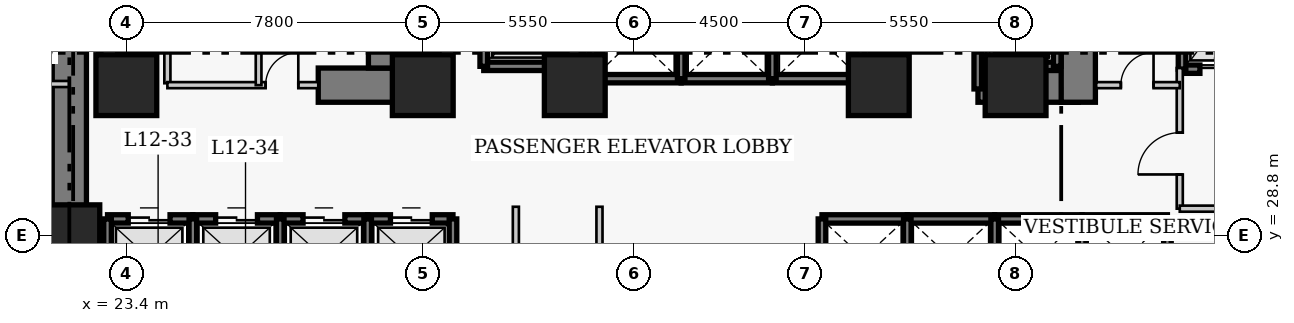
"""IFC4 building model, lengths in metres.
Left out: names, types, materials, properties, quantities, classifications, styles, units other than length and angle.
Written with IfcOpenShell. Run it as: python <this file> out.ifc"""

import sys

from ifc_helpers import new_model, si_unit, direction, frame, frame_2d, origin, origin_2d, place, context, subcontext, project, spatial, rectangle, extrude, element, fill, save


model = new_model("IFC4")
c1 = context("Model", 3, precision=1e-05, world=origin(), true_north=direction((0.0, 1.0)))
c2 = subcontext(c1, "Body", "Model", "MODEL_VIEW")
j1 = project(units=[si_unit("LENGTHUNIT", "METRE"), si_unit("PLANEANGLEUNIT", "RADIAN")], contexts=[c1])
p1 = place(None, origin())
s1 = spatial("IfcSite", under=j1, at=p1, CompositionType="ELEMENT")
p2 = place(p1, origin())
s2 = spatial("IfcBuilding", under=s1, at=p2, CompositionType="ELEMENT")
p3 = place(p2, frame((0.0, 0.0, 52.6)))
s3 = spatial("IfcBuildingStorey", under=s2, at=p3, CompositionType="ELEMENT", Elevation=52.6)
p4 = place(p3, frame((21.9, 27.05, 0.0), z_axis=(0.0, 0.0, 1.0), x_axis=(0.0, 1.0, 0.0)))
e1 = element("IfcWall", 1, at=p4, inside=s3, PredefinedType="SHEAR", context=c2, shape_type="SweptSolid", body=[
    extrude(rectangle(XDim=13.72, YDim=0.9, at=frame_2d((6.86, 0.0))), origin(), (0.0, 0.0, 1.0), 3.8),
])
p5 = place(p3, frame((28.45, 32.75, 0.0), z_axis=(0.0, 0.0, 1.0), x_axis=(1.0, 0.0, 0.0)))
e2 = element("IfcWall", 2, at=p5, inside=s3, PredefinedType="SHEAR", context=c2, shape_type="SweptSolid", body=[
    extrude(rectangle(XDim=2.4, YDim=0.9, at=frame_2d((1.2, 0.0))), origin(), (0.0, 0.0, 1.0), 3.8),
])
p6 = place(p3, frame((45.81, 32.75, 0.0), z_axis=(0.0, 0.0, 1.0), x_axis=(1.0, 0.0, 0.0)))
e3 = element("IfcWall", 3, at=p6, inside=s3, PredefinedType="SHEAR", context=c2, shape_type="SweptSolid", body=[
    extrude(rectangle(XDim=2.64, YDim=0.9, at=frame_2d((1.32, 0.0))), origin(), (0.0, 0.0, 1.0), 3.8),
])
p7 = place(p3, frame((30.22, 33.2, 0.0), z_axis=(0.0, 0.0, 1.0), x_axis=(0.0, 1.0, 0.0)))
e4 = element("IfcWall", 4, at=p7, inside=s3, PredefinedType="SHEAR", context=c2, shape_type="SweptSolid", body=[
    extrude(rectangle(XDim=7.12, YDim=0.9, at=frame_2d((3.56, 0.0))), origin(), (0.0, 0.0, 1.0), 3.8),
])
p8 = place(p3, frame((48.45, 32.3, 0.0), z_axis=(0.0, 0.0, 1.0), x_axis=(0.0, 1.0, 0.0)))
e5 = element("IfcWall", 5, at=p8, inside=s3, PredefinedType="SHEAR", context=c2, shape_type="SweptSolid", body=[
    extrude(rectangle(XDim=8.02, YDim=0.9, at=frame_2d((4.01, 0.0))), origin(), (0.0, 0.0, 1.0), 3.8),
])
p9 = place(p8, frame((5.9, 0.0, 0.0)))
e6 = element("IfcOpeningElement", 6, at=p9, cuts=e5, PredefinedType="OPENING", context=c2, shape_type="SweptSolid", body=[
    extrude(rectangle(XDim=1.1, YDim=2.15, at=frame_2d((0.55, 1.075))), frame((0.0, 0.46, 0.0), z_axis=(0.0, -1.0, 0.0), x_axis=(1.0, 0.0, 0.0)), (0.0, 0.0, 1.0), 0.92),
])
for number, where, z_axis, x_axis in (
    (7, (21.9, 28.8, 0.0), (0.0, 0.0, 1.0), (1.0, 0.0, 0.0)),
    (8, (23.4, 32.75, 0.0), (0.0, 0.0, 1.0), (1.0, 0.0, 0.0)),
    (9, (31.2, 32.75, 0.0), (0.0, 0.0, 1.0), (1.0, 0.0, 0.0)),
    (10, (35.2, 32.75, 0.0), (0.0, 0.0, 1.0), (1.0, 0.0, 0.0)),
    (11, (43.2, 32.75, 0.0), (0.0, 0.0, 1.0), (1.0, 0.0, 0.0)),
    (12, (46.8, 32.75, 0.0), (0.0, 0.0, 1.0), (1.0, 0.0, 0.0)),
):
    element("IfcColumn", number, at=place(p3, frame(where, z_axis=z_axis, x_axis=x_axis)), inside=s3, PredefinedType="COLUMN", context=c2, shape_type="SweptSolid", body=[
        extrude(rectangle(XDim=1.6, YDim=1.6, at=origin_2d()), origin(), (0.0, 0.0, 1.0), 3.8),
    ])
p10 = place(p3, frame((22.905, 29.23, 0.0), z_axis=(0.0, 0.0, 1.0), x_axis=(1.0, 0.0, 0.0)))
e13 = element("IfcWall", 13, at=p10, inside=s3, PredefinedType="SHEAR", context=c2, shape_type="SweptSolid", body=[
    extrude(rectangle(XDim=2.245, YDim=0.22, at=frame_2d((1.123, 0.0))), origin(), (0.0, 0.0, 1.0), 3.8),
])
p11 = place(p10, frame((0.545, 0.0, 0.0)))
e14 = element("IfcOpeningElement", 14, at=p11, cuts=e13, PredefinedType="OPENING", context=c2, shape_type="SweptSolid", body=[
    extrude(rectangle(XDim=1.1, YDim=2.15, at=frame_2d((0.55, 1.075))), frame((0.0, 0.12, 0.0), z_axis=(0.0, -1.0, 0.0), x_axis=(1.0, 0.0, 0.0)), (0.0, 0.0, 1.0), 0.24),
])
p12 = place(p3, frame((22.905, 27.17, 0.0), z_axis=(0.0, 0.0, 1.0), x_axis=(0.0, 1.0, 0.0)))
e15 = element("IfcWall", 15, at=p12, inside=s3, PredefinedType="SHEAR", context=c2, shape_type="SweptSolid", body=[
    extrude(rectangle(XDim=2.06, YDim=0.2, at=frame_2d((1.03, 0.0))), origin(), (0.0, 0.0, 1.0), 3.8),
])
p13 = place(p3, frame((25.15, 29.23, 0.0), z_axis=(0.0, 0.0, 1.0), x_axis=(1.0, 0.0, 0.0)))
e16 = element("IfcWall", 16, at=p13, inside=s3, PredefinedType="SHEAR", context=c2, shape_type="SweptSolid", body=[
    extrude(rectangle(XDim=2.3, YDim=0.22, at=frame_2d((1.15, 0.0))), origin(), (0.0, 0.0, 1.0), 3.8),
])
p14 = place(p13, frame((0.6, 0.0, 0.0)))
e17 = element("IfcOpeningElement", 17, at=p14, cuts=e16, PredefinedType="OPENING", context=c2, shape_type="SweptSolid", body=[
    extrude(rectangle(XDim=1.1, YDim=2.15, at=frame_2d((0.55, 1.075))), frame((0.0, 0.12, 0.0), z_axis=(0.0, -1.0, 0.0), x_axis=(1.0, 0.0, 0.0)), (0.0, 0.0, 1.0), 0.24),
])
p15 = place(p3, frame((25.15, 27.17, 0.0), z_axis=(0.0, 0.0, 1.0), x_axis=(0.0, 1.0, 0.0)))
e18 = element("IfcWall", 18, at=p15, inside=s3, PredefinedType="SHEAR", context=c2, shape_type="SweptSolid", body=[
    extrude(rectangle(XDim=2.06, YDim=0.2, at=frame_2d((1.03, 0.0))), origin(), (0.0, 0.0, 1.0), 3.8),
])
p16 = place(p3, frame((27.45, 29.23, 0.0), z_axis=(0.0, 0.0, 1.0), x_axis=(1.0, 0.0, 0.0)))
e19 = element("IfcWall", 19, at=p16, inside=s3, PredefinedType="SHEAR", context=c2, shape_type="SweptSolid", body=[
    extrude(rectangle(XDim=2.3, YDim=0.22, at=frame_2d((1.15, 0.0))), origin(), (0.0, 0.0, 1.0), 3.8),
])
p17 = place(p16, frame((0.6, 0.0, 0.0)))
e20 = element("IfcOpeningElement", 20, at=p17, cuts=e19, PredefinedType="OPENING", context=c2, shape_type="SweptSolid", body=[
    extrude(rectangle(XDim=1.1, YDim=2.15, at=frame_2d((0.55, 1.075))), frame((0.0, 0.12, 0.0), z_axis=(0.0, -1.0, 0.0), x_axis=(1.0, 0.0, 0.0)), (0.0, 0.0, 1.0), 0.24),
])
p18 = place(p3, frame((27.45, 27.17, 0.0), z_axis=(0.0, 0.0, 1.0), x_axis=(0.0, 1.0, 0.0)))
e21 = element("IfcWall", 21, at=p18, inside=s3, PredefinedType="SHEAR", context=c2, shape_type="SweptSolid", body=[
    extrude(rectangle(XDim=2.06, YDim=0.2, at=frame_2d((1.03, 0.0))), origin(), (0.0, 0.0, 1.0), 3.8),
])
p19 = place(p3, frame((29.75, 29.23, 0.0), z_axis=(0.0, 0.0, 1.0), x_axis=(1.0, 0.0, 0.0)))
e22 = element("IfcWall", 22, at=p19, inside=s3, PredefinedType="SHEAR", context=c2, shape_type="SweptSolid", body=[
    extrude(rectangle(XDim=2.245, YDim=0.22, at=frame_2d((1.123, 0.0))), origin(), (0.0, 0.0, 1.0), 3.8),
])
p20 = place(p19, frame((0.6, 0.0, 0.0)))
e23 = element("IfcOpeningElement", 23, at=p20, cuts=e22, PredefinedType="OPENING", context=c2, shape_type="SweptSolid", body=[
    extrude(rectangle(XDim=1.1, YDim=2.15, at=frame_2d((0.55, 1.075))), frame((0.0, 0.12, 0.0), z_axis=(0.0, -1.0, 0.0), x_axis=(1.0, 0.0, 0.0)), (0.0, 0.0, 1.0), 0.24),
])
for number, where, z_axis, x_axis in (
    (24, (29.75, 27.17, 0.0), (0.0, 0.0, 1.0), (0.0, 1.0, 0.0)),
    (25, (31.995, 27.17, 0.0), (0.0, 0.0, 1.0), (0.0, 1.0, 0.0)),
):
    element("IfcWall", number, at=place(p3, frame(where, z_axis=z_axis, x_axis=x_axis)), inside=s3, PredefinedType="SHEAR", context=c2, shape_type="SweptSolid", body=[
        extrude(rectangle(XDim=2.06, YDim=0.2, at=frame_2d((1.03, 0.0))), origin(), (0.0, 0.0, 1.0), 3.8),
    ])
p21 = place(p3, frame((41.705, 29.23, 0.0), z_axis=(0.0, 0.0, 1.0), x_axis=(1.0, 0.0, 0.0)))
e26 = element("IfcWall", 26, at=p21, inside=s3, PredefinedType="SHEAR", context=c2, shape_type="SweptSolid", body=[
    extrude(rectangle(XDim=2.245, YDim=0.22, at=frame_2d((1.123, 0.0))), origin(), (0.0, 0.0, 1.0), 3.8),
])
p22 = place(p3, frame((41.705, 27.17, 0.0), z_axis=(0.0, 0.0, 1.0), x_axis=(0.0, 1.0, 0.0)))
e27 = element("IfcWall", 27, at=p22, inside=s3, PredefinedType="SHEAR", context=c2, shape_type="SweptSolid", body=[
    extrude(rectangle(XDim=2.06, YDim=0.2, at=frame_2d((1.03, 0.0))), origin(), (0.0, 0.0, 1.0), 3.8),
])
p23 = place(p3, frame((43.95, 29.23, 0.0), z_axis=(0.0, 0.0, 1.0), x_axis=(1.0, 0.0, 0.0)))
e28 = element("IfcWall", 28, at=p23, inside=s3, PredefinedType="SHEAR", context=c2, shape_type="SweptSolid", body=[
    extrude(rectangle(XDim=2.3, YDim=0.22, at=frame_2d((1.15, 0.0))), origin(), (0.0, 0.0, 1.0), 3.8),
])
p24 = place(p3, frame((43.95, 27.17, 0.0), z_axis=(0.0, 0.0, 1.0), x_axis=(0.0, 1.0, 0.0)))
e29 = element("IfcWall", 29, at=p24, inside=s3, PredefinedType="SHEAR", context=c2, shape_type="SweptSolid", body=[
    extrude(rectangle(XDim=2.06, YDim=0.2, at=frame_2d((1.03, 0.0))), origin(), (0.0, 0.0, 1.0), 3.8),
])
p25 = place(p3, frame((46.25, 29.23, 0.0), z_axis=(0.0, 0.0, 1.0), x_axis=(1.0, 0.0, 0.0)))
e30 = element("IfcWall", 30, at=p25, inside=s3, PredefinedType="SHEAR", context=c2, shape_type="SweptSolid", body=[
    extrude(rectangle(XDim=2.3, YDim=0.22, at=frame_2d((1.15, 0.0))), origin(), (0.0, 0.0, 1.0), 3.8),
])
p26 = place(p3, frame((46.25, 27.17, 0.0), z_axis=(0.0, 0.0, 1.0), x_axis=(0.0, 1.0, 0.0)))
e31 = element("IfcWall", 31, at=p26, inside=s3, PredefinedType="SHEAR", context=c2, shape_type="SweptSolid", body=[
    extrude(rectangle(XDim=2.06, YDim=0.2, at=frame_2d((1.03, 0.0))), origin(), (0.0, 0.0, 1.0), 3.8),
])
p27 = place(p3, frame((48.55, 29.23, 0.0), z_axis=(0.0, 0.0, 1.0), x_axis=(1.0, 0.0, 0.0)))
e32 = element("IfcWall", 32, at=p27, inside=s3, PredefinedType="SHEAR", context=c2, shape_type="SweptSolid", body=[
    extrude(rectangle(XDim=2.245, YDim=0.22, at=frame_2d((1.123, 0.0))), origin(), (0.0, 0.0, 1.0), 3.8),
])
for number, where, z_axis, x_axis in (
    (33, (48.55, 27.17, 0.0), (0.0, 0.0, 1.0), (0.0, 1.0, 0.0)),
    (34, (50.795, 27.17, 0.0), (0.0, 0.0, 1.0), (0.0, 1.0, 0.0)),
):
    element("IfcWall", number, at=place(p3, frame(where, z_axis=z_axis, x_axis=x_axis)), inside=s3, PredefinedType="SHEAR", context=c2, shape_type="SweptSolid", body=[
        extrude(rectangle(XDim=2.06, YDim=0.2, at=frame_2d((1.03, 0.0))), origin(), (0.0, 0.0, 1.0), 3.8),
    ])
p28 = place(p3, frame((35.68, 32.92, 0.0), z_axis=(0.0, 0.0, 1.0), x_axis=(1.0, 0.0, 0.0)))
e35 = element("IfcWall", 35, at=p28, inside=s3, PredefinedType="SHEAR", context=c2, shape_type="SweptSolid", body=[
    extrude(rectangle(XDim=2.32, YDim=0.22, at=frame_2d((1.16, 0.0))), origin(), (0.0, 0.0, 1.0), 3.8),
])
p29 = place(p3, frame((35.68, 32.92, 0.0), z_axis=(0.0, 0.0, 1.0), x_axis=(0.0, 1.0, 0.0)))
e36 = element("IfcWall", 36, at=p29, inside=s3, PredefinedType="SHEAR", context=c2, shape_type="SweptSolid", body=[
    extrude(rectangle(XDim=2.16, YDim=0.2, at=frame_2d((1.08, 0.0))), origin(), (0.0, 0.0, 1.0), 3.8),
])
p30 = place(p3, frame((38.0, 32.92, 0.0), z_axis=(0.0, 0.0, 1.0), x_axis=(1.0, 0.0, 0.0)))
e37 = element("IfcWall", 37, at=p30, inside=s3, PredefinedType="SHEAR", context=c2, shape_type="SweptSolid", body=[
    extrude(rectangle(XDim=2.4, YDim=0.22, at=frame_2d((1.2, 0.0))), origin(), (0.0, 0.0, 1.0), 3.8),
])
p31 = place(p3, frame((38.0, 32.92, 0.0), z_axis=(0.0, 0.0, 1.0), x_axis=(0.0, 1.0, 0.0)))
e38 = element("IfcWall", 38, at=p31, inside=s3, PredefinedType="SHEAR", context=c2, shape_type="SweptSolid", body=[
    extrude(rectangle(XDim=2.16, YDim=0.2, at=frame_2d((1.08, 0.0))), origin(), (0.0, 0.0, 1.0), 3.8),
])
p32 = place(p3, frame((40.4, 32.92, 0.0), z_axis=(0.0, 0.0, 1.0), x_axis=(1.0, 0.0, 0.0)))
e39 = element("IfcWall", 39, at=p32, inside=s3, PredefinedType="SHEAR", context=c2, shape_type="SweptSolid", body=[
    extrude(rectangle(XDim=2.32, YDim=0.22, at=frame_2d((1.16, 0.0))), origin(), (0.0, 0.0, 1.0), 3.8),
])
for number, where, z_axis, x_axis in (
    (40, (40.4, 32.92, 0.0), (0.0, 0.0, 1.0), (0.0, 1.0, 0.0)),
    (41, (42.72, 32.92, 0.0), (0.0, 0.0, 1.0), (0.0, 1.0, 0.0)),
):
    element("IfcWall", number, at=place(p3, frame(where, z_axis=z_axis, x_axis=x_axis)), inside=s3, PredefinedType="SHEAR", context=c2, shape_type="SweptSolid", body=[
        extrude(rectangle(XDim=2.16, YDim=0.2, at=frame_2d((1.08, 0.0))), origin(), (0.0, 0.0, 1.0), 3.8),
    ])
p33 = place(p3, frame((51.18, 33.17, 0.0), z_axis=(0.0, 0.0, 1.0), x_axis=(1.0, 0.0, 0.0)))
e42 = element("IfcWall", 42, at=p33, inside=s3, PredefinedType="SHEAR", context=c2, shape_type="SweptSolid", body=[
    extrude(rectangle(XDim=2.42, YDim=0.22, at=frame_2d((1.21, 0.0))), origin(), (0.0, 0.0, 1.0), 3.8),
])
p34 = place(p33, frame((0.47, 0.0, 0.0)))
e43 = element("IfcOpeningElement", 43, at=p34, cuts=e42, PredefinedType="OPENING", context=c2, shape_type="SweptSolid", body=[
    extrude(rectangle(XDim=1.3, YDim=2.15, at=frame_2d((0.65, 1.075))), frame((0.0, 0.12, 0.0), z_axis=(0.0, -1.0, 0.0), x_axis=(1.0, 0.0, 0.0)), (0.0, 0.0, 1.0), 0.24),
])
p35 = place(p3, frame((51.18, 33.17, 0.0), z_axis=(0.0, 0.0, 1.0), x_axis=(0.0, 1.0, 0.0)))
e44 = element("IfcWall", 44, at=p35, inside=s3, PredefinedType="SHEAR", context=c2, shape_type="SweptSolid", body=[
    extrude(rectangle(XDim=2.86, YDim=0.2, at=frame_2d((1.43, 0.0))), origin(), (0.0, 0.0, 1.0), 3.8),
])
p36 = place(p3, frame((32.805, 33.245, 0.0), z_axis=(0.0, 0.0, 1.0), x_axis=(1.0, 0.0, 0.0)))
e45 = element("IfcWall", 45, at=p36, inside=s3, PredefinedType="SHEAR", context=c2, shape_type="SweptSolid", body=[
    extrude(rectangle(XDim=2.09, YDim=0.22, at=frame_2d((1.045, 0.0))), origin(), (0.0, 0.0, 1.0), 3.8),
])
for number, where, z_axis, x_axis in (
    (46, (32.805, 33.245, 0.0), (0.0, 0.0, 1.0), (0.0, 1.0, 0.0)),
    (47, (34.895, 33.245, 0.0), (0.0, 0.0, 1.0), (0.0, 1.0, 0.0)),
):
    element("IfcWall", number, at=place(p3, frame(where, z_axis=z_axis, x_axis=x_axis)), inside=s3, PredefinedType="SHEAR", context=c2, shape_type="SweptSolid", body=[
        extrude(rectangle(XDim=2.91, YDim=0.2, at=frame_2d((1.455, 0.0))), origin(), (0.0, 0.0, 1.0), 3.8),
    ])
p37 = place(p3, frame((45.805, 33.245, 0.0), z_axis=(0.0, 0.0, 1.0), x_axis=(1.0, 0.0, 0.0)))
e48 = element("IfcWall", 48, at=p37, inside=s3, PredefinedType="SHEAR", context=c2, shape_type="SweptSolid", body=[
    extrude(rectangle(XDim=2.09, YDim=0.22, at=frame_2d((1.045, 0.0))), origin(), (0.0, 0.0, 1.0), 3.8),
])
p38 = place(p3, frame((45.805, 32.65, 0.0), z_axis=(0.0, 0.0, 1.0), x_axis=(0.0, 1.0, 0.0)))
e49 = element("IfcWall", 49, at=p38, inside=s3, PredefinedType="SHEAR", context=c2, shape_type="SweptSolid", body=[
    extrude(rectangle(XDim=3.505, YDim=0.2, at=frame_2d((1.752, 0.0))), origin(), (0.0, 0.0, 1.0), 3.8),
])
p39 = place(p3, frame((47.895, 33.245, 0.0), z_axis=(0.0, 0.0, 1.0), x_axis=(0.0, 1.0, 0.0)))
e50 = element("IfcWall", 50, at=p39, inside=s3, PredefinedType="SHEAR", context=c2, shape_type="SweptSolid", body=[
    extrude(rectangle(XDim=2.91, YDim=0.2, at=frame_2d((1.455, 0.0))), origin(), (0.0, 0.0, 1.0), 3.8),
])
p40 = place(p3, frame((24.48, 32.8, 0.0), z_axis=(0.0, 0.0, 1.0), x_axis=(0.0, 1.0, 0.0)))
e51 = element("IfcWall", 51, at=p40, inside=s3, PredefinedType="PARTITIONING", context=c2, shape_type="SweptSolid", body=[
    extrude(rectangle(XDim=3.57, YDim=0.16, at=frame_2d((1.785, 0.0))), origin(), (0.0, 0.0, 1.0), 3.54),
])
p41 = place(p40, frame((1.604, 0.0, 0.0)))
e52 = element("IfcOpeningElement", 52, at=p41, cuts=e51, PredefinedType="OPENING", context=c2, shape_type="SweptSolid", body=[
    extrude(rectangle(XDim=0.9, YDim=2.1, at=frame_2d((0.45, 1.05))), frame((0.0, 0.09, 0.0), z_axis=(0.0, -1.0, 0.0), x_axis=(1.0, 0.0, 0.0)), (0.0, 0.0, 1.0), 0.18),
])
p42 = place(p3, frame((51.12, 29.5, 0.0), z_axis=(0.0, 0.0, 1.0), x_axis=(0.0, 1.0, 0.0)))
e53 = element("IfcWall", 53, at=p42, inside=s3, PredefinedType="PARTITIONING", context=c2, shape_type="SweptSolid", body=[
    extrude(rectangle(XDim=3.7, YDim=0.16, at=frame_2d((1.85, 0.0))), origin(), (0.0, 0.0, 1.0), 3.54),
])
p43 = place(p42, frame((0.9, 0.0, 0.0)))
e54 = element("IfcOpeningElement", 54, at=p43, cuts=e53, PredefinedType="OPENING", context=c2, shape_type="SweptSolid", body=[
    extrude(rectangle(XDim=1.1, YDim=2.15, at=frame_2d((0.55, 1.075))), frame((0.0, 0.09, 0.0), z_axis=(0.0, -1.0, 0.0), x_axis=(1.0, 0.0, 0.0)), (0.0, 0.0, 1.0), 0.18),
])
p44 = place(p3, frame((51.12, 29.5, 0.0), z_axis=(0.0, 0.0, 1.0), x_axis=(1.0, 0.0, 0.0)))
e55 = element("IfcWall", 55, at=p44, inside=s3, PredefinedType="PARTITIONING", context=c2, shape_type="SweptSolid", body=[
    extrude(rectangle(XDim=5.63, YDim=0.16, at=frame_2d((2.815, 0.0))), origin(), (0.0, 0.0, 1.0), 3.54),
])
p45 = place(p3, frame((24.48, 32.75, 0.0), z_axis=(0.0, 0.0, 1.0), x_axis=(1.0, 0.0, 0.0)))
e56 = element("IfcWall", 56, at=p45, inside=s3, PredefinedType="PARTITIONING", context=c2, shape_type="SweptSolid", body=[
    extrude(rectangle(XDim=3.97, YDim=0.16, at=frame_2d((1.985, 0.0))), origin(), (0.0, 0.0, 1.0), 3.54),
])
p46 = place(p45, frame((2.585, 0.0, 0.0)))
e57 = element("IfcOpeningElement", 57, at=p46, cuts=e56, PredefinedType="OPENING", context=c2, shape_type="SweptSolid", body=[
    extrude(rectangle(XDim=0.86, YDim=2.05, at=frame_2d((0.43, 1.025))), frame((0.0, 0.09, 0.0), z_axis=(0.0, -1.0, 0.0), x_axis=(1.0, 0.0, 0.0)), (0.0, 0.0, 1.0), 0.18),
])
p47 = place(p3, frame((48.92, 32.75, 0.0), z_axis=(0.0, 0.0, 1.0), x_axis=(1.0, 0.0, 0.0)))
e58 = element("IfcWall", 58, at=p47, inside=s3, PredefinedType="PARTITIONING", context=c2, shape_type="SweptSolid", body=[
    extrude(rectangle(XDim=2.2, YDim=0.16, at=frame_2d((1.1, 0.0))), origin(), (0.0, 0.0, 1.0), 3.54),
])
p48 = place(p47, frame((0.65, 0.0, 0.0)))
e59 = element("IfcOpeningElement", 59, at=p48, cuts=e58, PredefinedType="OPENING", context=c2, shape_type="SweptSolid", body=[
    extrude(rectangle(XDim=0.86, YDim=2.05, at=frame_2d((0.43, 1.025))), frame((0.0, 0.09, 0.0), z_axis=(0.0, -1.0, 0.0), x_axis=(1.0, 0.0, 0.0)), (0.0, 0.0, 1.0), 0.18),
])
p49 = place(p3, frame((26.88, 32.75, 0.0), z_axis=(0.0, 0.0, 1.0), x_axis=(0.0, 1.0, 0.0)))
e60 = element("IfcWall", 60, at=p49, inside=s3, PredefinedType="PARTITIONING", context=c2, shape_type="SweptSolid", body=[
    extrude(rectangle(XDim=3.62, YDim=0.15, at=frame_2d((1.81, 0.0))), origin(), (0.0, 0.0, 1.0), 3.54),
])
for number, where, z_axis, x_axis in (
    (61, (33.65, 26.26, 0.0), (0.0, 0.0, 1.0), (0.0, 1.0, 0.0)),
    (62, (35.85, 26.26, 0.0), (0.0, 0.0, 1.0), (0.0, 1.0, 0.0)),
):
    element("IfcWall", number, at=place(p3, frame(where, z_axis=z_axis, x_axis=x_axis)), inside=s3, PredefinedType="PARTITIONING", context=c2, shape_type="SweptSolid", body=[
        extrude(rectangle(XDim=3.29, YDim=0.16, at=frame_2d((1.645, 0.0))), origin(), (0.0, 0.0, 1.0), 3.54),
    ])
p50 = place(p3, frame((20.46, 32.78, 0.0), z_axis=(0.0, 0.0, 1.0), x_axis=(1.0, 0.0, 0.0)))
e63 = element("IfcWall", 63, at=p50, inside=s3, PredefinedType="PARTITIONING", context=c2, shape_type="SweptSolid", body=[
    extrude(rectangle(XDim=1.44, YDim=0.16, at=frame_2d((0.72, 0.0))), origin(), (0.0, 0.0, 1.0), 3.54),
])
p51 = place(p11, origin())
e64 = element("IfcDoor", 64, at=p51, inside=s3, OperationType="DOUBLE_DOOR_SLIDING", PredefinedType="DOOR", context=c2, shape_type="SweptSolid", body=[
    extrude(rectangle(XDim=1.1, YDim=2.15, at=frame_2d((0.55, 1.075))), frame((0.0, 0.025, 0.0), z_axis=(0.0, -1.0, 0.0), x_axis=(1.0, 0.0, 0.0)), (0.0, 0.0, 1.0), 0.05),
])
fill(e14, e64)
p52 = place(p14, origin())
e65 = element("IfcDoor", 65, at=p52, inside=s3, OperationType="DOUBLE_DOOR_SLIDING", PredefinedType="DOOR", context=c2, shape_type="SweptSolid", body=[
    extrude(rectangle(XDim=1.1, YDim=2.15, at=frame_2d((0.55, 1.075))), frame((0.0, 0.025, 0.0), z_axis=(0.0, -1.0, 0.0), x_axis=(1.0, 0.0, 0.0)), (0.0, 0.0, 1.0), 0.05),
])
fill(e17, e65)
p53 = place(p17, origin())
e66 = element("IfcDoor", 66, at=p53, inside=s3, OperationType="DOUBLE_DOOR_SLIDING", PredefinedType="DOOR", context=c2, shape_type="SweptSolid", body=[
    extrude(rectangle(XDim=1.1, YDim=2.15, at=frame_2d((0.55, 1.075))), frame((0.0, 0.025, 0.0), z_axis=(0.0, -1.0, 0.0), x_axis=(1.0, 0.0, 0.0)), (0.0, 0.0, 1.0), 0.05),
])
fill(e20, e66)
p54 = place(p20, origin())
e67 = element("IfcDoor", 67, at=p54, inside=s3, OperationType="DOUBLE_DOOR_SLIDING", PredefinedType="DOOR", context=c2, shape_type="SweptSolid", body=[
    extrude(rectangle(XDim=1.1, YDim=2.15, at=frame_2d((0.55, 1.075))), frame((0.0, 0.025, 0.0), z_axis=(0.0, -1.0, 0.0), x_axis=(1.0, 0.0, 0.0)), (0.0, 0.0, 1.0), 0.05),
])
fill(e23, e67)
p55 = place(p34, origin())
e68 = element("IfcDoor", 68, at=p55, inside=s3, OperationType="DOUBLE_DOOR_SLIDING", PredefinedType="DOOR", context=c2, shape_type="SweptSolid", body=[
    extrude(rectangle(XDim=1.3, YDim=2.15, at=frame_2d((0.65, 1.075))), frame((0.0, 0.025, 0.0), z_axis=(0.0, -1.0, 0.0), x_axis=(1.0, 0.0, 0.0)), (0.0, 0.0, 1.0), 0.05),
])
fill(e43, e68)
p56 = place(p43, origin())
e69 = element("IfcDoor", 69, at=p56, inside=s3, OperationType="SINGLE_SWING_LEFT", PredefinedType="DOOR", context=c2, shape_type="SweptSolid", body=[
    extrude(rectangle(XDim=1.1, YDim=2.15, at=frame_2d((0.55, 1.075))), frame((0.0, 0.025, 0.0), z_axis=(0.0, -1.0, 0.0), x_axis=(1.0, 0.0, 0.0)), (0.0, 0.0, 1.0), 0.05),
])
fill(e54, e69)
p57 = place(p46, origin())
e70 = element("IfcDoor", 70, at=p57, inside=s3, OperationType="SINGLE_SWING_RIGHT", PredefinedType="DOOR", context=c2, shape_type="SweptSolid", body=[
    extrude(rectangle(XDim=0.86, YDim=2.05, at=frame_2d((0.43, 1.025))), frame((0.0, 0.025, 0.0), z_axis=(0.0, -1.0, 0.0), x_axis=(1.0, 0.0, 0.0)), (0.0, 0.0, 1.0), 0.05),
])
fill(e57, e70)
p58 = place(p48, origin())
e71 = element("IfcDoor", 71, at=p58, inside=s3, OperationType="SINGLE_SWING_RIGHT", PredefinedType="DOOR", context=c2, shape_type="SweptSolid", body=[
    extrude(rectangle(XDim=0.86, YDim=2.05, at=frame_2d((0.43, 1.025))), frame((0.0, 0.025, 0.0), z_axis=(0.0, -1.0, 0.0), x_axis=(1.0, 0.0, 0.0)), (0.0, 0.0, 1.0), 0.05),
])
fill(e59, e71)
save(model, sys.argv[1])
